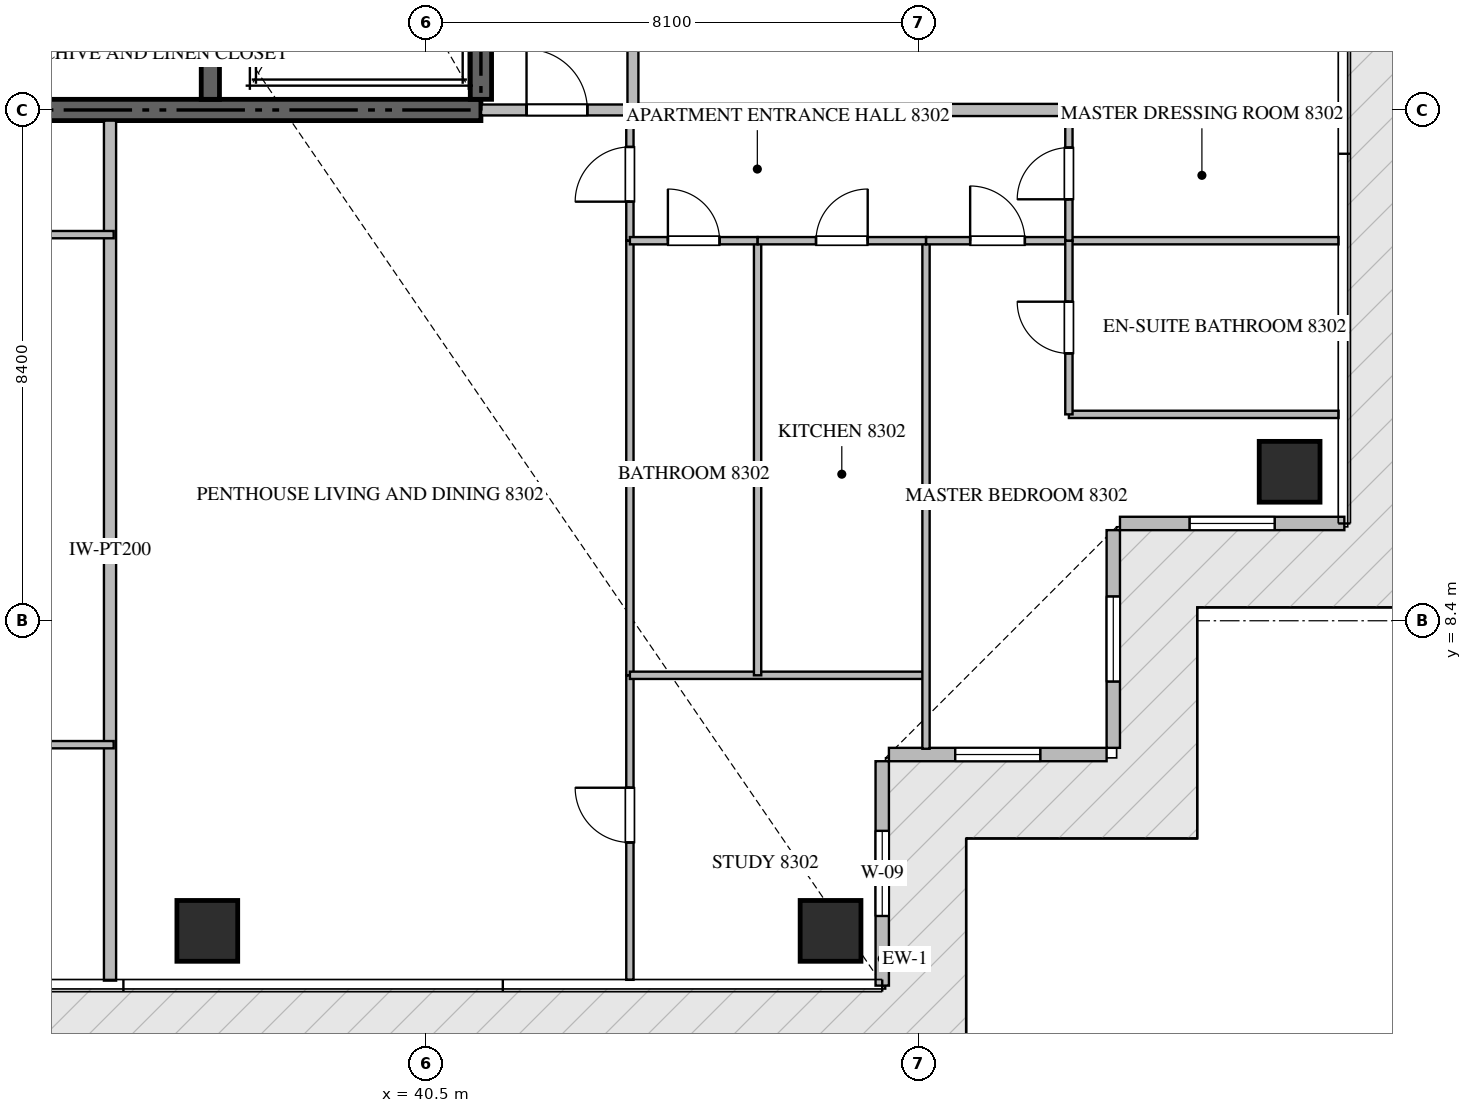
"""IFC4 building model, lengths in metres.
Left out: names, types, materials, properties, quantities, classifications, styles, units other than length and angle.
Written with IfcOpenShell. Run it as: python <this file> out.ifc"""

import sys

from ifc_helpers import new_model, si_unit, direction, frame, frame_2d, origin, origin_2d, place, context, subcontext, project, spatial, rectangle, extrude, source, transform, mapped, element, fill, save


model = new_model("IFC4")
c1 = context("Model", 3, precision=1e-05, world=origin(), true_north=direction((0.0, 1.0)))
c2 = subcontext(c1, "Body", "Model", "MODEL_VIEW")
j1 = project(units=[si_unit("LENGTHUNIT", "METRE"), si_unit("PLANEANGLEUNIT", "RADIAN")], contexts=[c1])
p1 = place(None, origin())
s1 = spatial("IfcSite", under=j1, at=p1, CompositionType="ELEMENT")
p2 = place(p1, origin())
s2 = spatial("IfcBuilding", under=s1, at=p2, CompositionType="ELEMENT")
p3 = place(p2, frame((0.0, 0.0, 333.95)))
s3 = spatial("IfcBuildingStorey", under=s2, at=p3, CompositionType="ELEMENT", Elevation=333.95)
p4 = place(p3, frame((23.4, 16.8, -0.26), z_axis=(0.0, 0.0, 1.0), x_axis=(1.0, 0.0, 0.0)))
e1 = element("IfcWall", 1, at=p4, inside=s3, PredefinedType="SHEAR", context=c2, shape_type="SweptSolid", body=[
    extrude(rectangle(XDim=18.0, YDim=0.35, at=frame_2d((9.0, 0.0))), origin(), (0.0, 0.0, 1.0), 3.868),
])
p5 = place(p3, frame((41.4, 16.975, -0.26), z_axis=(0.0, 0.0, 1.0), x_axis=(0.0, 1.0, 0.0)))
e2 = element("IfcWall", 2, at=p5, inside=s3, PredefinedType="SHEAR", context=c2, shape_type="SweptSolid", body=[
    extrude(rectangle(XDim=8.375, YDim=0.35, at=frame_2d((4.188, 0.0))), origin(), (0.0, 0.0, 1.0), 3.868),
])
p6 = place(p3, frame((36.95, 16.975, -0.26), z_axis=(0.0, 0.0, 1.0), x_axis=(0.0, 1.0, 0.0)))
e3 = element("IfcWall", 3, at=p6, inside=s3, PredefinedType="SHEAR", context=c2, shape_type="SweptSolid", body=[
    extrude(rectangle(XDim=8.375, YDim=0.3, at=frame_2d((4.188, 0.0))), origin(), (0.0, 0.0, 1.0), 3.868),
])
m1 = source(origin(), c2, "Body", "SweptSolid", [
    extrude(rectangle(XDim=1.0, YDim=1.0, at=origin_2d()), origin(), (0.0, 0.0, 1.0), 3.87),
])
for number, where, z_axis, x_axis in (
    (4, (36.9, 3.3, -0.26), (0.0, 0.0, 1.0), (1.0, 0.0, 0.0)),
    (5, (47.15, 3.3, -0.26), (0.0, 0.0, 1.0), (1.0, 0.0, 0.0)),
    (6, (54.7, 10.85, -0.26), (0.0, 0.0, 1.0), (1.0, 0.0, 0.0)),
):
    element("IfcColumn", number, at=place(p3, frame(where, z_axis=z_axis, x_axis=x_axis)), inside=s3, PredefinedType="COLUMN", context=c2, shape_type="MappedRepresentation", body=[
        mapped(m1, transform((0.0, 0.0, 0.0), scale=1.0)),
    ])
p7 = place(p3, frame((48.0, 2.4, 0.0), z_axis=(0.0, 0.0, 1.0), x_axis=(0.0, 1.0, 0.0)))
e7 = element("IfcWall", 7, at=p7, inside=s3, PredefinedType="ELEMENTEDWALL", context=c2, shape_type="SweptSolid", body=[
    extrude(rectangle(XDim=3.69, YDim=0.22, at=frame_2d((1.845, 0.0))), origin(), (0.0, 0.0, 1.0), 3.595),
])
p8 = place(p7, frame((1.145, 0.0, 0.65)))
e8 = element("IfcOpeningElement", 8, at=p8, cuts=e7, PredefinedType="OPENING", context=c2, shape_type="SweptSolid", body=[
    extrude(rectangle(XDim=1.4, YDim=1.35, at=frame_2d((0.7, 0.675))), frame((0.0, 0.12, 0.0), z_axis=(0.0, -1.0, 0.0), x_axis=(1.0, 0.0, 0.0)), (0.0, 0.0, 1.0), 0.24),
])
p9 = place(p3, frame((48.11, 6.2, 0.0), z_axis=(0.0, 0.0, 1.0), x_axis=(1.0, 0.0, 0.0)))
e9 = element("IfcWall", 9, at=p9, inside=s3, PredefinedType="ELEMENTEDWALL", context=c2, shape_type="SweptSolid", body=[
    extrude(rectangle(XDim=3.58, YDim=0.22, at=frame_2d((1.79, 0.0))), origin(), (0.0, 0.0, 1.0), 3.595),
])
p10 = place(p9, frame((1.09, 0.0, 0.65)))
e10 = element("IfcOpeningElement", 10, at=p10, cuts=e9, PredefinedType="OPENING", context=c2, shape_type="SweptSolid", body=[
    extrude(rectangle(XDim=1.4, YDim=1.35, at=frame_2d((0.7, 0.675))), frame((0.0, 0.12, 0.0), z_axis=(0.0, -1.0, 0.0), x_axis=(1.0, 0.0, 0.0)), (0.0, 0.0, 1.0), 0.24),
])
p11 = place(p3, frame((51.8, 6.31, 0.0), z_axis=(0.0, 0.0, 1.0), x_axis=(0.0, 1.0, 0.0)))
e11 = element("IfcWall", 11, at=p11, inside=s3, PredefinedType="ELEMENTEDWALL", context=c2, shape_type="SweptSolid", body=[
    extrude(rectangle(XDim=3.58, YDim=0.22, at=frame_2d((1.79, 0.0))), origin(), (0.0, 0.0, 1.0), 3.595),
])
p12 = place(p11, frame((1.09, 0.0, 0.65)))
e12 = element("IfcOpeningElement", 12, at=p12, cuts=e11, PredefinedType="OPENING", context=c2, shape_type="SweptSolid", body=[
    extrude(rectangle(XDim=1.4, YDim=1.35, at=frame_2d((0.7, 0.675))), frame((0.0, 0.12, 0.0), z_axis=(0.0, -1.0, 0.0), x_axis=(1.0, 0.0, 0.0)), (0.0, 0.0, 1.0), 0.24),
])
p13 = place(p3, frame((51.91, 10.0, 0.0), z_axis=(0.0, 0.0, 1.0), x_axis=(1.0, 0.0, 0.0)))
e13 = element("IfcWall", 13, at=p13, inside=s3, PredefinedType="ELEMENTEDWALL", context=c2, shape_type="SweptSolid", body=[
    extrude(rectangle(XDim=3.69, YDim=0.22, at=frame_2d((1.845, 0.0))), origin(), (0.0, 0.0, 1.0), 3.595),
])
p14 = place(p13, frame((1.145, 0.0, 0.65)))
e14 = element("IfcOpeningElement", 14, at=p14, cuts=e13, PredefinedType="OPENING", context=c2, shape_type="SweptSolid", body=[
    extrude(rectangle(XDim=1.4, YDim=1.35, at=frame_2d((0.7, 0.675))), frame((0.0, 0.12, 0.0), z_axis=(0.0, -1.0, 0.0), x_axis=(1.0, 0.0, 0.0)), (0.0, 0.0, 1.0), 0.24),
])
p15 = place(p3, frame((35.3, 2.482, 0.0), z_axis=(0.0, 0.0, 1.0), x_axis=(0.0, 1.0, 0.0)))
e15 = element("IfcWall", 15, at=p15, inside=s3, PredefinedType="PARTITIONING", context=c2, shape_type="SweptSolid", body=[
    extrude(rectangle(XDim=14.143, YDim=0.2, at=frame_2d((7.072, 0.0))), origin(), (0.0, 0.0, 1.0), 3.61),
])
p16 = place(p3, frame((43.9, 16.8, 0.0), z_axis=(0.0, 0.0, 1.0), x_axis=(1.0, 0.0, 0.0)))
e16 = element("IfcWall", 16, at=p16, inside=s3, PredefinedType="PARTITIONING", context=c2, shape_type="SweptSolid", body=[
    extrude(rectangle(XDim=11.618, YDim=0.2, at=frame_2d((5.809, 0.0))), origin(), (0.0, 0.0, 1.0), 3.61),
])
p17 = place(p3, frame((41.402, 16.8, 0.0), z_axis=(0.0, 0.0, 1.0), x_axis=(1.0, 0.0, 0.0)))
e17 = element("IfcWall", 17, at=p17, inside=s3, PredefinedType="PARTITIONING", context=c2, shape_type="SweptSolid", body=[
    extrude(rectangle(XDim=2.496, YDim=0.18, at=frame_2d((1.248, 0.0))), origin(), (0.0, 0.0, 1.0), 3.61),
])
p18 = place(p17, frame((0.748, 0.0, 0.0)))
e18 = element("IfcOpeningElement", 18, at=p18, cuts=e17, PredefinedType="OPENING", context=c2, shape_type="SweptSolid", body=[
    extrude(rectangle(XDim=1.0, YDim=2.15, at=frame_2d((0.5, 1.075))), frame((0.0, 0.1, 0.0), z_axis=(0.0, -1.0, 0.0), x_axis=(1.0, 0.0, 0.0)), (0.0, 0.0, 1.0), 0.2),
])
p19 = place(p3, frame((43.9, 16.8, 0.0), z_axis=(0.0, 0.0, 1.0), x_axis=(0.0, 1.0, 0.0)))
e19 = element("IfcWall", 19, at=p19, inside=s3, PredefinedType="PARTITIONING", context=c2, shape_type="SweptSolid", body=[
    extrude(rectangle(XDim=16.8, YDim=0.18, at=frame_2d((8.4, 0.0))), origin(), (0.0, 0.0, 1.0), 3.61),
])
p20 = place(p19, frame((2.67, 0.0, 0.0)))
e20 = element("IfcOpeningElement", 20, at=p20, cuts=e19, PredefinedType="OPENING", context=c2, shape_type="SweptSolid", body=[
    extrude(rectangle(XDim=1.0, YDim=2.15, at=frame_2d((0.5, 1.075))), frame((0.0, 0.1, 0.0), z_axis=(0.0, -1.0, 0.0), x_axis=(1.0, 0.0, 0.0)), (0.0, 0.0, 1.0), 0.2),
])
p21 = place(p19, frame((11.107, 0.0, 0.0)))
e21 = element("IfcOpeningElement", 21, at=p21, cuts=e19, PredefinedType="OPENING", context=c2, shape_type="SweptSolid", body=[
    extrude(rectangle(XDim=1.0, YDim=2.15, at=frame_2d((0.5, 1.075))), frame((0.0, 0.1, 0.0), z_axis=(0.0, -1.0, 0.0), x_axis=(1.0, 0.0, 0.0)), (0.0, 0.0, 1.0), 0.2),
])
for number, where, z_axis, x_axis in (
    (22, (26.3, 6.362, 0.0), (0.0, 0.0, 1.0), (1.0, 0.0, 0.0)),
    (23, (26.3, 14.75, 0.0), (0.0, 0.0, 1.0), (1.0, 0.0, 0.0)),
):
    element("IfcWall", number, at=place(p3, frame(where, z_axis=z_axis, x_axis=x_axis)), inside=s3, PredefinedType="PARTITIONING", context=c2, shape_type="SweptSolid", body=[
        extrude(rectangle(XDim=9.06, YDim=0.12, at=frame_2d((4.53, 0.0))), origin(), (0.0, 0.0, 1.0), 3.61),
    ])
p22 = place(p3, frame((43.85, 14.65, 0.0), z_axis=(0.0, 0.0, 1.0), x_axis=(0.0, 1.0, 0.0)))
e24 = element("IfcWall", 24, at=p22, inside=s3, PredefinedType="PARTITIONING", context=c2, shape_type="SweptSolid", body=[
    extrude(rectangle(XDim=2.148, YDim=0.12, at=frame_2d((1.074, 0.0))), origin(), (0.0, 0.0, 1.0), 3.61),
])
p23 = place(p22, frame((0.642, 0.0, 0.0)))
e25 = element("IfcOpeningElement", 25, at=p23, cuts=e24, PredefinedType="OPENING", context=c2, shape_type="SweptSolid", body=[
    extrude(rectangle(XDim=0.9, YDim=2.1, at=frame_2d((0.45, 1.05))), frame((0.0, 0.07, 0.0), z_axis=(0.0, -1.0, 0.0), x_axis=(1.0, 0.0, 0.0)), (0.0, 0.0, 1.0), 0.14),
])
p24 = place(p3, frame((43.85, 2.495, 0.0), z_axis=(0.0, 0.0, 1.0), x_axis=(0.0, 1.0, 0.0)))
e26 = element("IfcWall", 26, at=p24, inside=s3, PredefinedType="PARTITIONING", context=c2, shape_type="SweptSolid", body=[
    extrude(rectangle(XDim=5.008, YDim=0.12, at=frame_2d((2.504, 0.0))), origin(), (0.0, 0.0, 1.0), 3.61),
])
p25 = place(p24, frame((2.259, 0.0, 0.0)))
e27 = element("IfcOpeningElement", 27, at=p25, cuts=e26, PredefinedType="OPENING", context=c2, shape_type="SweptSolid", body=[
    extrude(rectangle(XDim=0.9, YDim=2.1, at=frame_2d((0.45, 1.05))), frame((0.0, 0.07, 0.0), z_axis=(0.0, -1.0, 0.0), x_axis=(1.0, 0.0, 0.0)), (0.0, 0.0, 1.0), 0.14),
])
p26 = place(p3, frame((43.85, 7.505, 0.0), z_axis=(0.0, 0.0, 1.0), x_axis=(0.0, 1.0, 0.0)))
e28 = element("IfcWall", 28, at=p26, inside=s3, PredefinedType="PARTITIONING", context=c2, shape_type="SweptSolid", body=[
    extrude(rectangle(XDim=7.143, YDim=0.12, at=frame_2d((3.572, 0.0))), origin(), (0.0, 0.0, 1.0), 3.61),
])
p27 = place(p3, frame((43.85, 7.503, 0.0), z_axis=(0.0, 0.0, 1.0), x_axis=(1.0, 0.0, 0.0)))
e29 = element("IfcWall", 29, at=p27, inside=s3, PredefinedType="PARTITIONING", context=c2, shape_type="SweptSolid", body=[
    extrude(rectangle(XDim=4.87, YDim=0.12, at=frame_2d((2.435, 0.0))), origin(), (0.0, 0.0, 1.0), 3.61),
])
p28 = place(p3, frame((48.72, 6.295, 0.0), z_axis=(0.0, 0.0, 1.0), x_axis=(0.0, 1.0, 0.0)))
e30 = element("IfcWall", 30, at=p28, inside=s3, PredefinedType="PARTITIONING", context=c2, shape_type="SweptSolid", body=[
    extrude(rectangle(XDim=8.355, YDim=0.12, at=frame_2d((4.177, 0.0))), origin(), (0.0, 0.0, 1.0), 3.61),
])
p29 = place(p3, frame((45.95, 7.503, 0.0), z_axis=(0.0, 0.0, 1.0), x_axis=(0.0, 1.0, 0.0)))
e31 = element("IfcWall", 31, at=p29, inside=s3, PredefinedType="PARTITIONING", context=c2, shape_type="SweptSolid", body=[
    extrude(rectangle(XDim=7.147, YDim=0.12, at=frame_2d((3.573, 0.0))), origin(), (0.0, 0.0, 1.0), 3.61),
])
p30 = place(p3, frame((43.85, 14.65, 0.0), z_axis=(0.0, 0.0, 1.0), x_axis=(1.0, 0.0, 0.0)))
e32 = element("IfcWall", 32, at=p30, inside=s3, PredefinedType="PARTITIONING", context=c2, shape_type="SweptSolid", body=[
    extrude(rectangle(XDim=2.1, YDim=0.12, at=frame_2d((1.05, 0.0))), origin(), (0.0, 0.0, 1.0), 3.61),
])
p31 = place(p30, frame((0.625, 0.0, 0.0)))
e33 = element("IfcOpeningElement", 33, at=p31, cuts=e32, PredefinedType="OPENING", context=c2, shape_type="SweptSolid", body=[
    extrude(rectangle(XDim=0.85, YDim=2.1, at=frame_2d((0.425, 1.05))), frame((0.0, 0.07, 0.0), z_axis=(0.0, -1.0, 0.0), x_axis=(1.0, 0.0, 0.0)), (0.0, 0.0, 1.0), 0.14),
])
p32 = place(p3, frame((45.952, 14.65, 0.0), z_axis=(0.0, 0.0, 1.0), x_axis=(1.0, 0.0, 0.0)))
e34 = element("IfcWall", 34, at=p32, inside=s3, PredefinedType="PARTITIONING", context=c2, shape_type="SweptSolid", body=[
    extrude(rectangle(XDim=2.768, YDim=0.12, at=frame_2d((1.384, 0.0))), origin(), (0.0, 0.0, 1.0), 3.61),
])
p33 = place(p32, frame((0.959, 0.0, 0.0)))
e35 = element("IfcOpeningElement", 35, at=p33, cuts=e34, PredefinedType="OPENING", context=c2, shape_type="SweptSolid", body=[
    extrude(rectangle(XDim=0.85, YDim=2.1, at=frame_2d((0.425, 1.05))), frame((0.0, 0.07, 0.0), z_axis=(0.0, -1.0, 0.0), x_axis=(1.0, 0.0, 0.0)), (0.0, 0.0, 1.0), 0.14),
])
p34 = place(p3, frame((48.722, 14.65, 0.0), z_axis=(0.0, 0.0, 1.0), x_axis=(1.0, 0.0, 0.0)))
e36 = element("IfcWall", 36, at=p34, inside=s3, PredefinedType="PARTITIONING", context=c2, shape_type="SweptSolid", body=[
    extrude(rectangle(XDim=2.348, YDim=0.12, at=frame_2d((1.174, 0.0))), origin(), (0.0, 0.0, 1.0), 3.61),
])
p35 = place(p34, frame((0.724, 0.0, 0.0)))
e37 = element("IfcOpeningElement", 37, at=p35, cuts=e36, PredefinedType="OPENING", context=c2, shape_type="SweptSolid", body=[
    extrude(rectangle(XDim=0.9, YDim=2.1, at=frame_2d((0.45, 1.05))), frame((0.0, 0.07, 0.0), z_axis=(0.0, -1.0, 0.0), x_axis=(1.0, 0.0, 0.0)), (0.0, 0.0, 1.0), 0.14),
])
p36 = place(p3, frame((51.07, 11.794, 0.0), z_axis=(0.0, 0.0, 1.0), x_axis=(1.0, 0.0, 0.0)))
e38 = element("IfcWall", 38, at=p36, inside=s3, PredefinedType="PARTITIONING", context=c2, shape_type="SweptSolid", body=[
    extrude(rectangle(XDim=4.435, YDim=0.12, at=frame_2d((2.217, 0.0))), origin(), (0.0, 0.0, 1.0), 3.61),
])
p37 = place(p3, frame((51.072, 14.65, 0.0), z_axis=(0.0, 0.0, 1.0), x_axis=(1.0, 0.0, 0.0)))
e39 = element("IfcWall", 39, at=p37, inside=s3, PredefinedType="PARTITIONING", context=c2, shape_type="SweptSolid", body=[
    extrude(rectangle(XDim=4.433, YDim=0.12, at=frame_2d((2.216, 0.0))), origin(), (0.0, 0.0, 1.0), 3.61),
])
p38 = place(p3, frame((51.07, 11.794, 0.0), z_axis=(0.0, 0.0, 1.0), x_axis=(0.0, 1.0, 0.0)))
e40 = element("IfcWall", 40, at=p38, inside=s3, PredefinedType="PARTITIONING", context=c2, shape_type="SweptSolid", body=[
    extrude(rectangle(XDim=2.856, YDim=0.12, at=frame_2d((1.428, 0.0))), origin(), (0.0, 0.0, 1.0), 3.61),
])
p39 = place(p38, frame((1.003, 0.0, 0.0)))
e41 = element("IfcOpeningElement", 41, at=p39, cuts=e40, PredefinedType="OPENING", context=c2, shape_type="SweptSolid", body=[
    extrude(rectangle(XDim=0.85, YDim=2.1, at=frame_2d((0.425, 1.05))), frame((0.0, 0.07, 0.0), z_axis=(0.0, -1.0, 0.0), x_axis=(1.0, 0.0, 0.0)), (0.0, 0.0, 1.0), 0.14),
])
p40 = place(p3, frame((51.07, 14.652, 0.0), z_axis=(0.0, 0.0, 1.0), x_axis=(0.0, 1.0, 0.0)))
e42 = element("IfcWall", 42, at=p40, inside=s3, PredefinedType="PARTITIONING", context=c2, shape_type="SweptSolid", body=[
    extrude(rectangle(XDim=2.208, YDim=0.12, at=frame_2d((1.104, 0.0))), origin(), (0.0, 0.0, 1.0), 3.61),
])
p41 = place(p40, frame((0.679, 0.0, 0.0)))
e43 = element("IfcOpeningElement", 43, at=p41, cuts=e42, PredefinedType="OPENING", context=c2, shape_type="SweptSolid", body=[
    extrude(rectangle(XDim=0.85, YDim=2.1, at=frame_2d((0.425, 1.05))), frame((0.0, 0.07, 0.0), z_axis=(0.0, -1.0, 0.0), x_axis=(1.0, 0.0, 0.0)), (0.0, 0.0, 1.0), 0.14),
])
m2 = source(origin(), c2, "Body", "SweptSolid", [
    extrude(rectangle(XDim=1.4, YDim=1.35, at=frame_2d((0.7, 0.675))), frame((0.0, 0.03, 0.0), z_axis=(0.0, -1.0, 0.0), x_axis=(1.0, 0.0, 0.0)), (0.0, 0.0, 1.0), 0.06),
])
p42 = place(p8, origin())
e44 = element("IfcWindow", 44, at=p42, inside=s3, PartitioningType="SINGLE_PANEL", PredefinedType="WINDOW", context=c2, shape_type="MappedRepresentation", body=[
    mapped(m2, transform((0.0, 0.0, 0.0), scale=1.0)),
])
fill(e8, e44)
p43 = place(p10, origin())
e45 = element("IfcWindow", 45, at=p43, inside=s3, PartitioningType="SINGLE_PANEL", PredefinedType="WINDOW", context=c2, shape_type="MappedRepresentation", body=[
    mapped(m2, transform((0.0, 0.0, 0.0), scale=1.0)),
])
fill(e10, e45)
p44 = place(p12, origin())
e46 = element("IfcWindow", 46, at=p44, inside=s3, PartitioningType="SINGLE_PANEL", PredefinedType="WINDOW", context=c2, shape_type="MappedRepresentation", body=[
    mapped(m2, transform((0.0, 0.0, 0.0), scale=1.0)),
])
fill(e12, e46)
p45 = place(p14, origin())
e47 = element("IfcWindow", 47, at=p45, inside=s3, PartitioningType="SINGLE_PANEL", PredefinedType="WINDOW", context=c2, shape_type="MappedRepresentation", body=[
    mapped(m2, transform((0.0, 0.0, 0.0), scale=1.0)),
])
fill(e14, e47)
m3 = source(origin(), c2, "Body", "SweptSolid", [
    extrude(rectangle(XDim=1.0, YDim=2.15, at=frame_2d((0.5, 1.075))), frame((0.0, 0.025, 0.0), z_axis=(0.0, -1.0, 0.0), x_axis=(1.0, 0.0, 0.0)), (0.0, 0.0, 1.0), 0.05),
])
p46 = place(p18, origin())
e48 = element("IfcDoor", 48, at=p46, inside=s3, OperationType="SINGLE_SWING_LEFT", PredefinedType="DOOR", context=c2, shape_type="MappedRepresentation", body=[
    mapped(m3, transform((0.0, 0.0, 0.0), scale=1.0)),
])
fill(e18, e48)
m4 = source(origin(), c2, "Body", "SweptSolid", [
    extrude(rectangle(XDim=0.9, YDim=2.1, at=frame_2d((0.45, 1.05))), frame((0.0, 0.025, 0.0), z_axis=(0.0, -1.0, 0.0), x_axis=(1.0, 0.0, 0.0)), (0.0, 0.0, 1.0), 0.05),
])
p47 = place(p23, origin())
e49 = element("IfcDoor", 49, at=p47, inside=s3, OperationType="SINGLE_SWING_LEFT", PredefinedType="DOOR", context=c2, shape_type="MappedRepresentation", body=[
    mapped(m4, transform((0.0, 0.0, 0.0), scale=1.0)),
])
fill(e25, e49)
p48 = place(p25, origin())
e50 = element("IfcDoor", 50, at=p48, inside=s3, OperationType="SINGLE_SWING_RIGHT", PredefinedType="DOOR", context=c2, shape_type="MappedRepresentation", body=[
    mapped(m4, transform((0.0, 0.0, 0.0), scale=1.0)),
])
fill(e27, e50)
m5 = source(origin(), c2, "Body", "SweptSolid", [
    extrude(rectangle(XDim=0.85, YDim=2.1, at=frame_2d((0.425, 1.05))), frame((0.0, 0.025, 0.0), z_axis=(0.0, -1.0, 0.0), x_axis=(1.0, 0.0, 0.0)), (0.0, 0.0, 1.0), 0.05),
])
p49 = place(p31, origin())
e51 = element("IfcDoor", 51, at=p49, inside=s3, OperationType="SINGLE_SWING_LEFT", PredefinedType="DOOR", context=c2, shape_type="MappedRepresentation", body=[
    mapped(m5, transform((0.0, 0.0, 0.0), scale=1.0)),
])
fill(e33, e51)
p50 = place(p33, origin())
e52 = element("IfcDoor", 52, at=p50, inside=s3, OperationType="SINGLE_SWING_RIGHT", PredefinedType="DOOR", context=c2, shape_type="MappedRepresentation", body=[
    mapped(m5, transform((0.0, 0.0, 0.0), scale=1.0)),
])
fill(e35, e52)
p51 = place(p35, origin())
e53 = element("IfcDoor", 53, at=p51, inside=s3, OperationType="SINGLE_SWING_LEFT", PredefinedType="DOOR", context=c2, shape_type="MappedRepresentation", body=[
    mapped(m4, transform((0.0, 0.0, 0.0), scale=1.0)),
])
fill(e37, e53)
p52 = place(p39, origin())
e54 = element("IfcDoor", 54, at=p52, inside=s3, OperationType="SINGLE_SWING_RIGHT", PredefinedType="DOOR", context=c2, shape_type="MappedRepresentation", body=[
    mapped(m5, transform((0.0, 0.0, 0.0), scale=1.0)),
])
fill(e41, e54)
p53 = place(p41, origin())
e55 = element("IfcDoor", 55, at=p53, inside=s3, OperationType="SINGLE_SWING_LEFT", PredefinedType="DOOR", context=c2, shape_type="MappedRepresentation", body=[
    mapped(m5, transform((0.0, 0.0, 0.0), scale=1.0)),
])
fill(e43, e55)
save(model, sys.argv[1])
